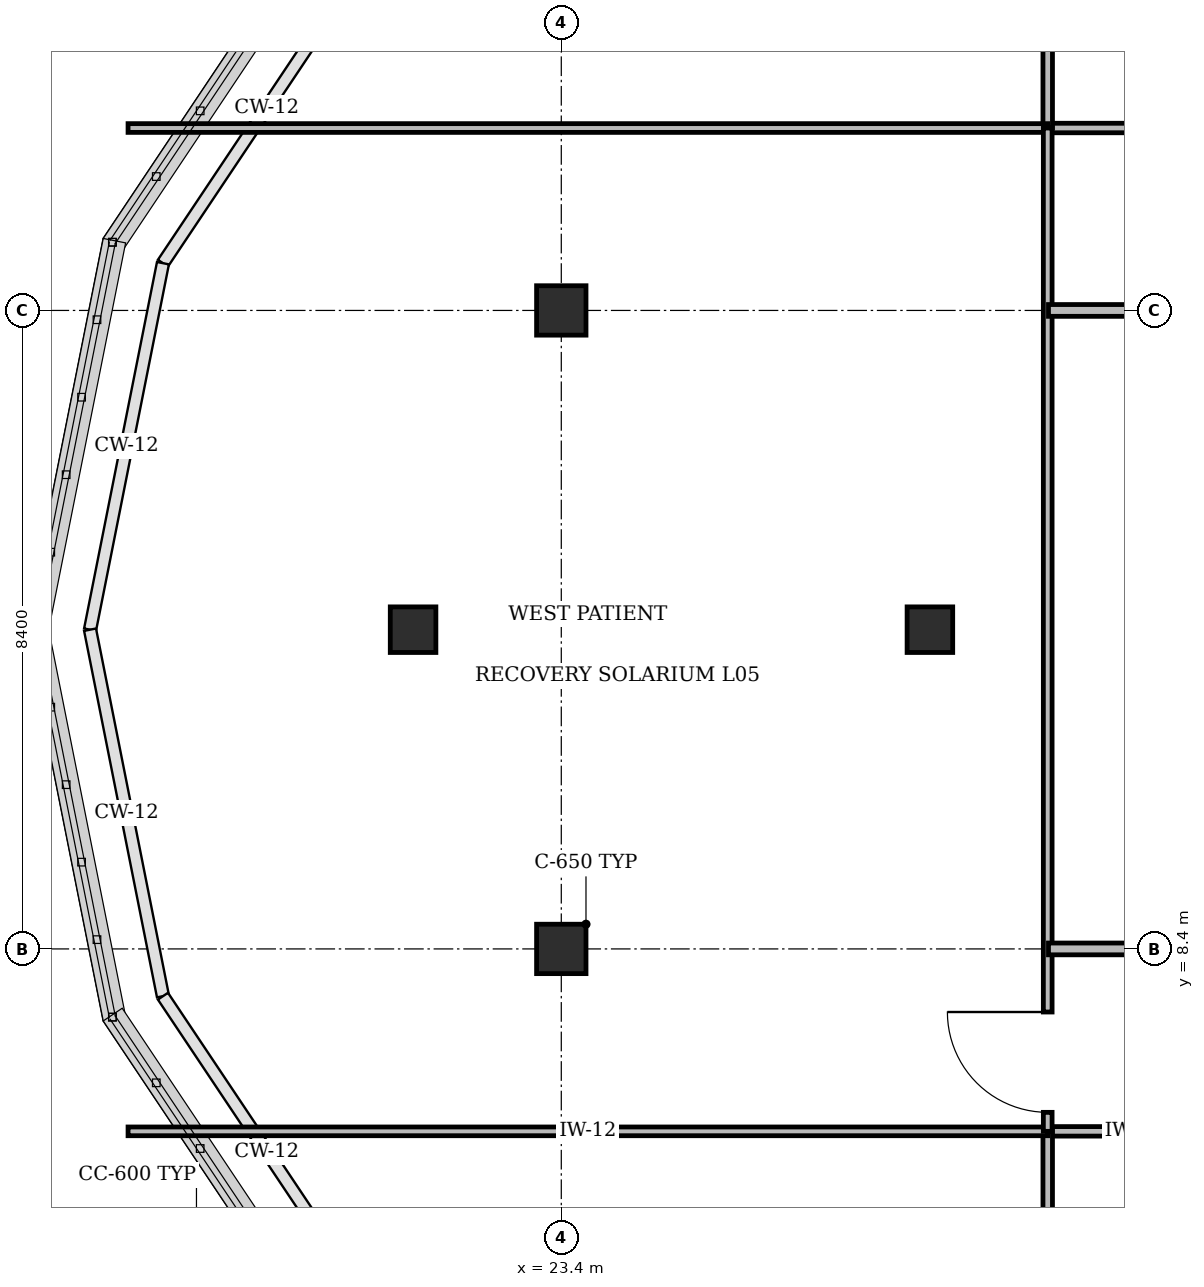
"""IFC4 building model, lengths in metres.
Left out: names, types, materials, properties, quantities, classifications, styles, units other than length and angle.
Written with IfcOpenShell. Run it as: python <this file> out.ifc"""

import sys

from ifc_helpers import new_model, si_unit, direction, frame, frame_2d, origin, origin_2d, place, context, subcontext, project, spatial, rectangle, circle, extrude, element, fill, save


model = new_model("IFC4")
c1 = context("Model", 3, precision=1e-05, world=origin(), true_north=direction((0.0, 1.0)))
c2 = subcontext(c1, "Body", "Model", "MODEL_VIEW")
j1 = project(units=[si_unit("LENGTHUNIT", "METRE"), si_unit("PLANEANGLEUNIT", "RADIAN")], contexts=[c1])
p1 = place(None, origin())
s1 = spatial("IfcSite", under=j1, at=p1, CompositionType="ELEMENT")
p2 = place(p1, origin())
s2 = spatial("IfcBuilding", under=s1, at=p2, CompositionType="ELEMENT")
p3 = place(p2, frame((0.0, 0.0, 22.2)))
s3 = spatial("IfcBuildingStorey", under=s2, at=p3, CompositionType="ELEMENT", Elevation=22.2)
for number, where, z_axis, x_axis in (
    (1, (23.4, 8.4, 0.0), (0.0, 0.0, 1.0), (1.0, 0.0, 0.0)),
    (2, (23.4, 16.8, 0.0), (0.0, 0.0, 1.0), (1.0, 0.0, 0.0)),
):
    element("IfcColumn", number, at=place(p3, frame(where, z_axis=z_axis, x_axis=x_axis)), inside=s3, PredefinedType="COLUMN", context=c2, shape_type="SweptSolid", body=[
        extrude(rectangle(XDim=0.65, YDim=0.65, at=origin_2d()), origin(), (0.0, 0.0, 1.0), 4.2),
    ])
p4 = place(p3, frame((21.45, 12.6, 0.0), z_axis=(0.0, 0.0, 1.0), x_axis=(1.0, 0.0, 0.0)))
e3 = element("IfcColumn", 3, at=p4, inside=s3, PredefinedType="PILASTER", context=c2, shape_type="SweptSolid", body=[
    extrude(circle(Radius=0.3, at=origin_2d()), origin(), (0.0, 0.0, 1.0), 3.95),
])
p5 = place(p3, frame((28.25, 12.6, 0.0), z_axis=(0.0, 0.0, 1.0), x_axis=(1.0, 0.0, 0.0)))
e4 = element("IfcColumn", 4, at=p5, inside=s3, PredefinedType="PILASTER", context=c2, shape_type="SweptSolid", body=[
    extrude(circle(Radius=0.3, at=origin_2d()), origin(), (0.0, 0.0, 1.0), 4.2),
])
p6 = place(p3, frame((29.8, 6.0, 0.0), z_axis=(0.0, 0.0, 1.0), x_axis=(1.0, 0.0, 0.0)))
e5 = element("IfcWall", 5, at=p6, inside=s3, PredefinedType="PARTITIONING", context=c2, shape_type="SweptSolid", body=[
    extrude(rectangle(XDim=2.25, YDim=0.125, at=frame_2d((1.125, 0.0))), origin(), (0.0, 0.0, 1.0), 3.9),
])
p7 = place(p3, frame((29.8, 0.045, 0.0), z_axis=(0.0, 0.0, 1.0), x_axis=(0.0, 1.0, 0.0)))
e6 = element("IfcWall", 6, at=p7, inside=s3, PredefinedType="PARTITIONING", context=c2, shape_type="SweptSolid", body=[
    extrude(rectangle(XDim=5.955, YDim=0.125, at=frame_2d((2.978, 0.0))), origin(), (0.0, 0.0, 1.0), 3.9),
])
p8 = place(p3, frame((29.8, 19.2, 0.0), z_axis=(0.0, 0.0, 1.0), x_axis=(1.0, 0.0, 0.0)))
e7 = element("IfcWall", 7, at=p8, inside=s3, PredefinedType="PARTITIONING", context=c2, shape_type="SweptSolid", body=[
    extrude(rectangle(XDim=2.25, YDim=0.125, at=frame_2d((1.125, 0.0))), origin(), (0.0, 0.0, 1.0), 3.9),
])
p9 = place(p3, frame((29.8, 19.2, 0.0), z_axis=(0.0, 0.0, 1.0), x_axis=(0.0, 1.0, 0.0)))
e8 = element("IfcWall", 8, at=p9, inside=s3, PredefinedType="PARTITIONING", context=c2, shape_type="SweptSolid", body=[
    extrude(rectangle(XDim=5.955, YDim=0.125, at=frame_2d((2.978, 0.0))), origin(), (0.0, 0.0, 1.0), 3.9),
])
for number, where, z_axis, x_axis in (
    (9, (17.7, 6.0, 0.0), (0.0, 0.0, 1.0), (1.0, 0.0, 0.0)),
    (10, (17.7, 19.2, 0.0), (0.0, 0.0, 1.0), (1.0, 0.0, 0.0)),
):
    element("IfcWall", number, at=place(p3, frame(where, z_axis=z_axis, x_axis=x_axis)), inside=s3, PredefinedType="PARTITIONING", context=c2, shape_type="SweptSolid", body=[
        extrude(rectangle(XDim=12.1, YDim=0.115, at=frame_2d((6.05, 0.0))), origin(), (0.0, 0.0, 1.0), 3.9),
    ])
p10 = place(p3, frame((29.8, 6.0, 0.0), z_axis=(0.0, 0.0, 1.0), x_axis=(0.0, 1.0, 0.0)))
e11 = element("IfcWall", 11, at=p10, inside=s3, PredefinedType="PARTITIONING", context=c2, shape_type="SweptSolid", body=[
    extrude(rectangle(XDim=13.2, YDim=0.115, at=frame_2d((6.6, 0.0))), origin(), (0.0, 0.0, 1.0), 3.9),
])
p11 = place(p10, frame((0.25, 0.0, 0.0)))
e12 = element("IfcOpeningElement", 12, at=p11, cuts=e11, PredefinedType="OPENING", context=c2, shape_type="SweptSolid", body=[
    extrude(rectangle(XDim=1.32, YDim=2.15, at=frame_2d((0.66, 1.075))), frame((0.0, 0.067, 0.0), z_axis=(0.0, -1.0, 0.0), x_axis=(1.0, 0.0, 0.0)), (0.0, 0.0, 1.0), 0.135),
])
p12 = place(p3, frame((29.81, 8.4, 0.0), z_axis=(0.0, 0.0, 1.0), x_axis=(1.0, 0.0, 0.0)))
e13 = element("IfcWall", 13, at=p12, inside=s3, PredefinedType="PARTITIONING", context=c2, shape_type="SweptSolid", body=[
    extrude(rectangle(XDim=16.43, YDim=0.155, at=frame_2d((8.215, 0.0))), origin(), (0.0, 0.0, 1.0), 3.27),
])
p13 = place(p12, frame((5.872, 0.0, 0.0)))
e14 = element("IfcOpeningElement", 14, at=p13, cuts=e13, PredefinedType="OPENING", context=c2, shape_type="SweptSolid", body=[
    extrude(rectangle(XDim=1.4, YDim=2.2, at=frame_2d((0.7, 1.1))), frame((0.0, 0.087, 0.0), z_axis=(0.0, -1.0, 0.0), x_axis=(1.0, 0.0, 0.0)), (0.0, 0.0, 1.0), 0.175),
])
p14 = place(p3, frame((29.81, 16.8, 0.0), z_axis=(0.0, 0.0, 1.0), x_axis=(1.0, 0.0, 0.0)))
e15 = element("IfcWall", 15, at=p14, inside=s3, PredefinedType="PARTITIONING", context=c2, shape_type="SweptSolid", body=[
    extrude(rectangle(XDim=16.43, YDim=0.155, at=frame_2d((8.215, 0.0))), origin(), (0.0, 0.0, 1.0), 3.27),
])
p15 = place(p11, origin())
e16 = element("IfcDoor", 16, at=p15, inside=s3, OperationType="SINGLE_SWING_RIGHT", PredefinedType="DOOR", context=c2, shape_type="SweptSolid", body=[
    extrude(rectangle(XDim=1.32, YDim=2.15, at=frame_2d((0.66, 1.075))), frame((0.0, 0.025, 0.0), z_axis=(0.0, -1.0, 0.0), x_axis=(1.0, 0.0, 0.0)), (0.0, 0.0, 1.0), 0.05),
])
fill(e12, e16)
save(model, sys.argv[1])
